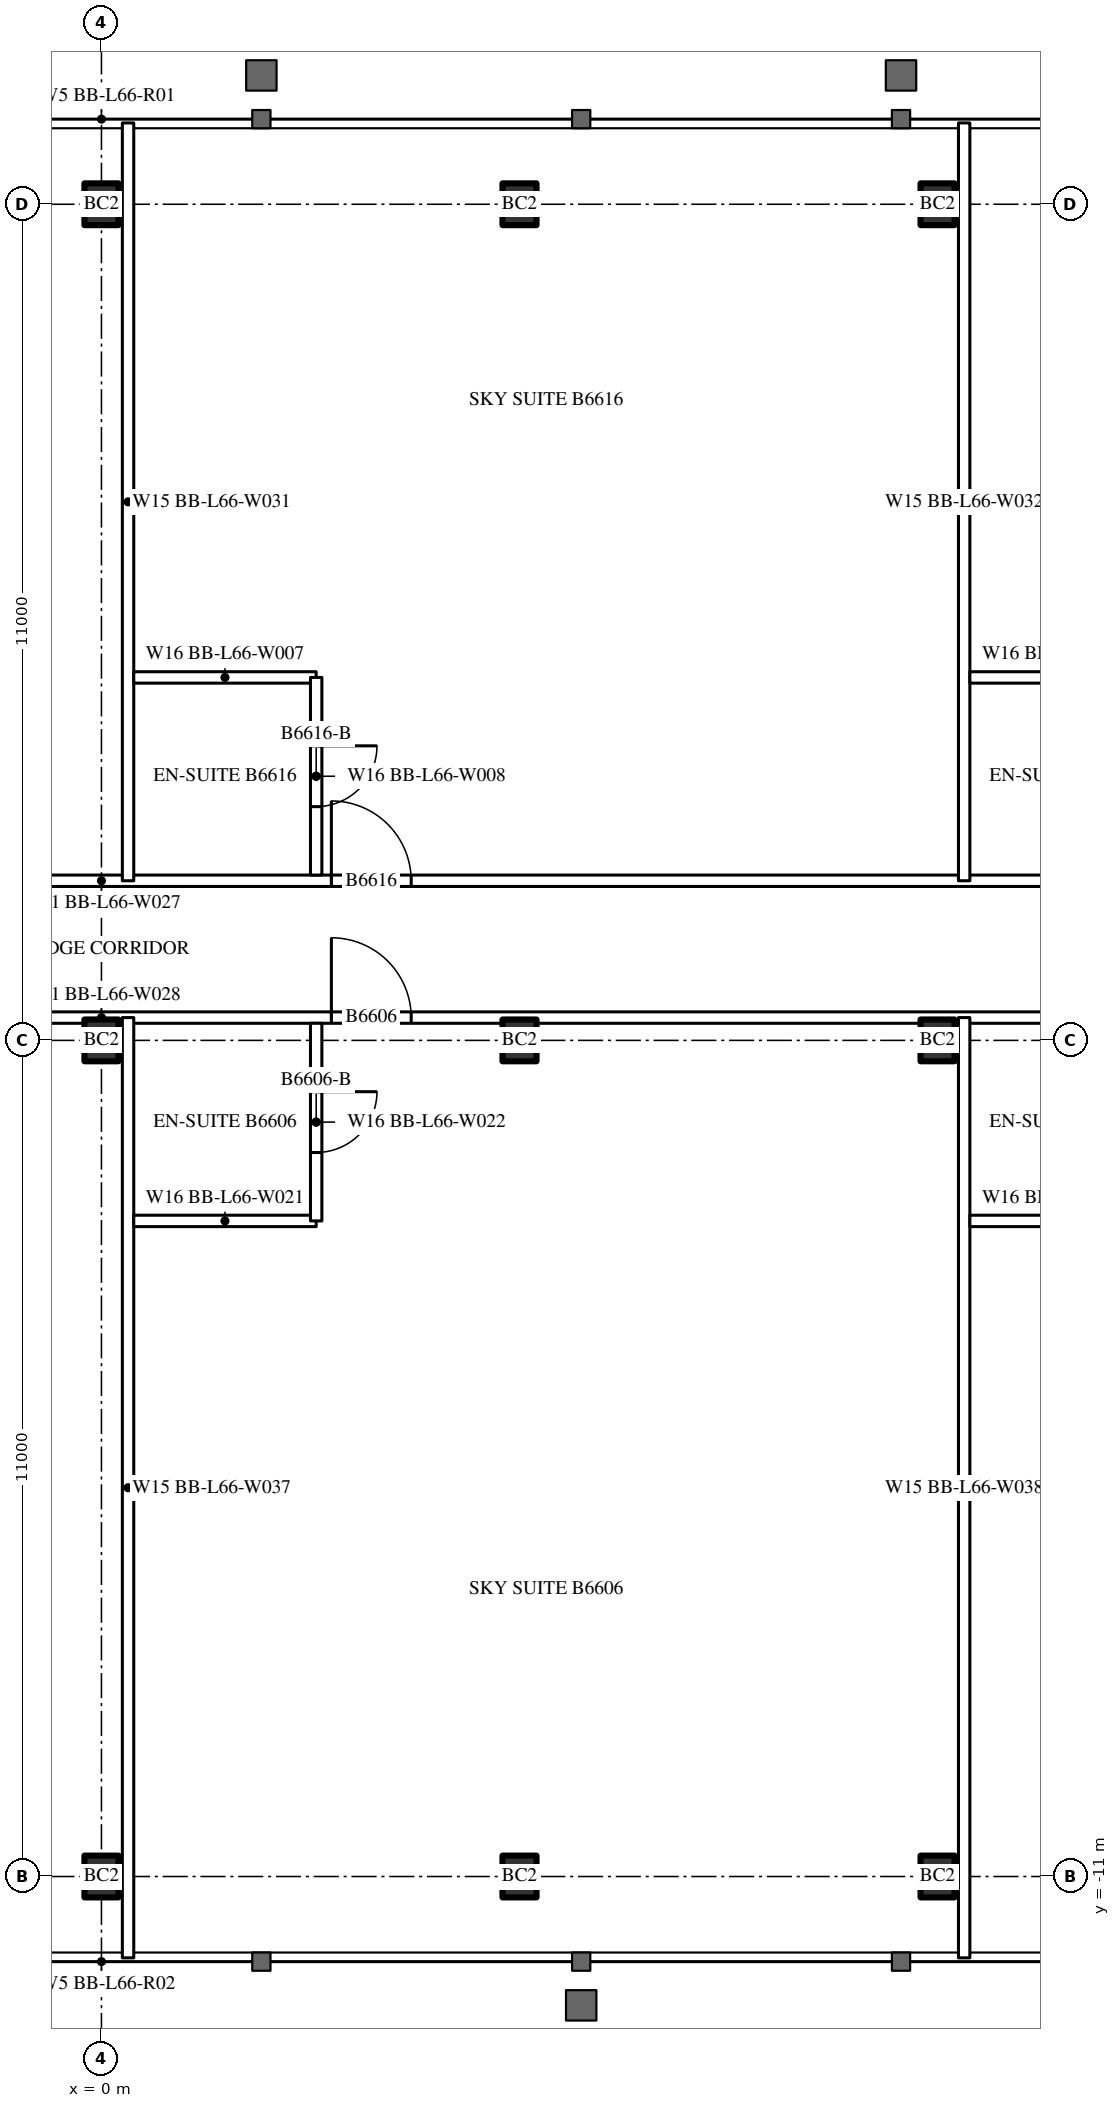
"""IFC4 building model, lengths in metres.
Left out: names, types, materials, properties, quantities, classifications, styles, units other than length and angle.
Written with IfcOpenShell. Run it as: python <this file> out.ifc"""

import sys

from ifc_helpers import new_model, si_unit, direction, frame, frame_2d, origin, origin_2d, place, context, subcontext, project, spatial, rectangle, i_section, extrude, element, fill, save


model = new_model("IFC4")
c1 = context("Model", 3, precision=1e-05, world=origin(), true_north=direction((0.0, 1.0)))
c2 = subcontext(c1, "Body", "Model", "MODEL_VIEW")
j1 = project(units=[si_unit("LENGTHUNIT", "METRE"), si_unit("PLANEANGLEUNIT", "RADIAN")], contexts=[c1])
p1 = place(None, origin())
s1 = spatial("IfcSite", under=j1, at=p1, CompositionType="ELEMENT")
p2 = place(p1, origin())
s2 = spatial("IfcBuilding", under=s1, at=p2, CompositionType="ELEMENT")
p3 = place(p2, frame((0.0, 0.0, 247.7)))
s3 = spatial("IfcBuildingStorey", under=s2, at=p3, CompositionType="ELEMENT", Elevation=247.7)
for number, where, z_axis, x_axis in (
    (1, (0.0, -11.0, 0.0), (0.0, 0.0, 1.0), (1.0, 0.0, 0.0)),
    (2, (5.5, -11.0, 0.0), (0.0, 0.0, 1.0), (1.0, 0.0, 0.0)),
    (3, (11.0, -11.0, 0.0), (0.0, 0.0, 1.0), (1.0, 0.0, 0.0)),
    (4, (0.0, 0.0, 0.0), (0.0, 0.0, 1.0), (1.0, 0.0, 0.0)),
    (5, (5.5, 0.0, 0.0), (0.0, 0.0, 1.0), (1.0, 0.0, 0.0)),
    (6, (11.0, 0.0, 0.0), (0.0, 0.0, 1.0), (1.0, 0.0, 0.0)),
    (7, (0.0, 11.0, 0.0), (0.0, 0.0, 1.0), (1.0, 0.0, 0.0)),
    (8, (5.5, 11.0, 0.0), (0.0, 0.0, 1.0), (1.0, 0.0, 0.0)),
    (9, (11.0, 11.0, 0.0), (0.0, 0.0, 1.0), (1.0, 0.0, 0.0)),
):
    element("IfcColumn", number, at=place(p3, frame(where, z_axis=z_axis, x_axis=x_axis)), inside=s3, PredefinedType="COLUMN", context=c2, shape_type="SweptSolid", body=[
        extrude(i_section(OverallWidth=0.448, OverallDepth=0.55, WebThickness=0.072, FlangeThickness=0.115, FilletRadius=0.02, at=origin_2d()), origin(), (0.0, 0.0, 1.0), 4.2),
    ])
p4 = place(p3, frame((-27.5, 0.3, 0.0), z_axis=(0.0, 0.0, 1.0), x_axis=(1.0, 0.0, 0.0)))
e10 = element("IfcWall", 10, at=p4, inside=s3, PredefinedType="PARTITIONING", context=c2, shape_type="SweptSolid", body=[
    extrude(rectangle(XDim=55.0, YDim=0.15, at=frame_2d((27.5, 0.0))), origin(), (0.0, 0.0, 1.0), 3.0),
])
p5 = place(p4, frame((1.575, 0.0, 0.0)))
e11 = element("IfcOpeningElement", 11, at=p5, cuts=e10, PredefinedType="OPENING", context=c2, shape_type="SweptSolid", body=[
    extrude(rectangle(XDim=1.0, YDim=2.2, at=frame_2d((0.5, 1.1))), frame((0.0, 0.085, 0.0), z_axis=(0.0, -1.0, 0.0), x_axis=(1.0, 0.0, 0.0)), (0.0, 0.0, 1.0), 0.17),
])
p6 = place(p4, frame((8.525, 0.0, 0.0)))
e12 = element("IfcOpeningElement", 12, at=p6, cuts=e10, PredefinedType="OPENING", context=c2, shape_type="SweptSolid", body=[
    extrude(rectangle(XDim=1.05, YDim=2.4, at=frame_2d((0.525, 1.2))), frame((0.0, 0.085, 0.0), z_axis=(0.0, -1.0, 0.0), x_axis=(1.0, 0.0, 0.0)), (0.0, 0.0, 1.0), 0.17),
])
p7 = place(p4, frame((19.525, 0.0, 0.0)))
e13 = element("IfcOpeningElement", 13, at=p7, cuts=e10, PredefinedType="OPENING", context=c2, shape_type="SweptSolid", body=[
    extrude(rectangle(XDim=1.05, YDim=2.4, at=frame_2d((0.525, 1.2))), frame((0.0, 0.085, 0.0), z_axis=(0.0, -1.0, 0.0), x_axis=(1.0, 0.0, 0.0)), (0.0, 0.0, 1.0), 0.17),
])
p8 = place(p4, frame((25.025, 0.0, 0.0)))
e14 = element("IfcOpeningElement", 14, at=p8, cuts=e10, PredefinedType="OPENING", context=c2, shape_type="SweptSolid", body=[
    extrude(rectangle(XDim=1.05, YDim=2.4, at=frame_2d((0.525, 1.2))), frame((0.0, 0.085, 0.0), z_axis=(0.0, -1.0, 0.0), x_axis=(1.0, 0.0, 0.0)), (0.0, 0.0, 1.0), 0.17),
])
p9 = place(p4, frame((30.525, 0.0, 0.0)))
e15 = element("IfcOpeningElement", 15, at=p9, cuts=e10, PredefinedType="OPENING", context=c2, shape_type="SweptSolid", body=[
    extrude(rectangle(XDim=1.05, YDim=2.4, at=frame_2d((0.525, 1.2))), frame((0.0, 0.085, 0.0), z_axis=(0.0, -1.0, 0.0), x_axis=(1.0, 0.0, 0.0)), (0.0, 0.0, 1.0), 0.17),
])
p10 = place(p4, frame((41.525, 0.0, 0.0)))
e16 = element("IfcOpeningElement", 16, at=p10, cuts=e10, PredefinedType="OPENING", context=c2, shape_type="SweptSolid", body=[
    extrude(rectangle(XDim=1.05, YDim=2.4, at=frame_2d((0.525, 1.2))), frame((0.0, 0.085, 0.0), z_axis=(0.0, -1.0, 0.0), x_axis=(1.0, 0.0, 0.0)), (0.0, 0.0, 1.0), 0.17),
])
p11 = place(p4, frame((52.525, 0.0, 0.0)))
e17 = element("IfcOpeningElement", 17, at=p11, cuts=e10, PredefinedType="OPENING", context=c2, shape_type="SweptSolid", body=[
    extrude(rectangle(XDim=1.05, YDim=2.4, at=frame_2d((0.525, 1.2))), frame((0.0, 0.085, 0.0), z_axis=(0.0, -1.0, 0.0), x_axis=(1.0, 0.0, 0.0)), (0.0, 0.0, 1.0), 0.17),
])
p12 = place(p3, frame((-27.5, 2.1, 0.0), z_axis=(0.0, 0.0, 1.0), x_axis=(1.0, 0.0, 0.0)))
e18 = element("IfcWall", 18, at=p12, inside=s3, PredefinedType="PARTITIONING", context=c2, shape_type="SweptSolid", body=[
    extrude(rectangle(XDim=55.0, YDim=0.15, at=frame_2d((27.5, 0.0))), origin(), (0.0, 0.0, 1.0), 4.0),
])
p13 = place(p12, frame((2.025, 0.0, 0.0)))
e19 = element("IfcOpeningElement", 19, at=p13, cuts=e18, PredefinedType="OPENING", context=c2, shape_type="SweptSolid", body=[
    extrude(rectangle(XDim=1.05, YDim=2.4, at=frame_2d((0.525, 1.2))), frame((0.0, 0.085, 0.0), z_axis=(0.0, -1.0, 0.0), x_axis=(1.0, 0.0, 0.0)), (0.0, 0.0, 1.0), 0.17),
])
p14 = place(p12, frame((8.525, 0.0, 0.0)))
e20 = element("IfcOpeningElement", 20, at=p14, cuts=e18, PredefinedType="OPENING", context=c2, shape_type="SweptSolid", body=[
    extrude(rectangle(XDim=1.05, YDim=2.4, at=frame_2d((0.525, 1.2))), frame((0.0, 0.085, 0.0), z_axis=(0.0, -1.0, 0.0), x_axis=(1.0, 0.0, 0.0)), (0.0, 0.0, 1.0), 0.17),
])
p15 = place(p12, frame((19.525, 0.0, 0.0)))
e21 = element("IfcOpeningElement", 21, at=p15, cuts=e18, PredefinedType="OPENING", context=c2, shape_type="SweptSolid", body=[
    extrude(rectangle(XDim=1.05, YDim=2.4, at=frame_2d((0.525, 1.2))), frame((0.0, 0.085, 0.0), z_axis=(0.0, -1.0, 0.0), x_axis=(1.0, 0.0, 0.0)), (0.0, 0.0, 1.0), 0.17),
])
p16 = place(p12, frame((30.525, 0.0, 0.0)))
e22 = element("IfcOpeningElement", 22, at=p16, cuts=e18, PredefinedType="OPENING", context=c2, shape_type="SweptSolid", body=[
    extrude(rectangle(XDim=1.05, YDim=2.4, at=frame_2d((0.525, 1.2))), frame((0.0, 0.085, 0.0), z_axis=(0.0, -1.0, 0.0), x_axis=(1.0, 0.0, 0.0)), (0.0, 0.0, 1.0), 0.17),
])
p17 = place(p12, frame((41.525, 0.0, 0.0)))
e23 = element("IfcOpeningElement", 23, at=p17, cuts=e18, PredefinedType="OPENING", context=c2, shape_type="SweptSolid", body=[
    extrude(rectangle(XDim=1.05, YDim=2.4, at=frame_2d((0.525, 1.2))), frame((0.0, 0.085, 0.0), z_axis=(0.0, -1.0, 0.0), x_axis=(1.0, 0.0, 0.0)), (0.0, 0.0, 1.0), 0.17),
])
p18 = place(p12, frame((52.525, 0.0, 0.0)))
e24 = element("IfcOpeningElement", 24, at=p18, cuts=e18, PredefinedType="OPENING", context=c2, shape_type="SweptSolid", body=[
    extrude(rectangle(XDim=1.05, YDim=2.4, at=frame_2d((0.525, 1.2))), frame((0.0, 0.085, 0.0), z_axis=(0.0, -1.0, 0.0), x_axis=(1.0, 0.0, 0.0)), (0.0, 0.0, 1.0), 0.17),
])
for number, where, z_axis, x_axis in (
    (25, (0.35, -12.07, 0.0), (0.0, 0.0, 1.0), (0.0, 1.0, 0.0)),
    (26, (11.35, -12.07, 0.0), (0.0, 0.0, 1.0), (0.0, 1.0, 0.0)),
):
    element("IfcWall", number, at=place(p3, frame(where, z_axis=z_axis, x_axis=x_axis)), inside=s3, PredefinedType="PARTITIONING", context=c2, shape_type="SweptSolid", body=[
        extrude(rectangle(XDim=12.37, YDim=0.15, at=frame_2d((6.185, 0.0))), origin(), (0.0, 0.0, 1.0), 4.0),
    ])
p19 = place(p3, frame((0.425, -2.375, 0.0), z_axis=(0.0, 0.0, 1.0), x_axis=(1.0, 0.0, 0.0)))
e27 = element("IfcWall", 27, at=p19, inside=s3, PredefinedType="PARTITIONING", context=c2, shape_type="SweptSolid", body=[
    extrude(rectangle(XDim=2.4, YDim=0.15, at=frame_2d((1.2, 0.0))), origin(), (0.0, 0.0, 1.0), 4.0),
])
p20 = place(p3, frame((2.825, -2.375, 0.0), z_axis=(0.0, 0.0, 1.0), x_axis=(0.0, 1.0, 0.0)))
e28 = element("IfcWall", 28, at=p20, inside=s3, PredefinedType="PARTITIONING", context=c2, shape_type="SweptSolid", body=[
    extrude(rectangle(XDim=2.6, YDim=0.15, at=frame_2d((1.3, 0.0))), origin(), (0.0, 0.0, 1.0), 4.0),
])
p21 = place(p20, frame((0.9, 0.0, 0.0)))
e29 = element("IfcOpeningElement", 29, at=p21, cuts=e28, PredefinedType="OPENING", context=c2, shape_type="SweptSolid", body=[
    extrude(rectangle(XDim=0.8, YDim=2.2, at=frame_2d((0.4, 1.1))), frame((0.0, 0.085, 0.0), z_axis=(0.0, -1.0, 0.0), x_axis=(1.0, 0.0, 0.0)), (0.0, 0.0, 1.0), 0.17),
])
p22 = place(p3, frame((11.425, -2.375, 0.0), z_axis=(0.0, 0.0, 1.0), x_axis=(1.0, 0.0, 0.0)))
e30 = element("IfcWall", 30, at=p22, inside=s3, PredefinedType="PARTITIONING", context=c2, shape_type="SweptSolid", body=[
    extrude(rectangle(XDim=2.4, YDim=0.15, at=frame_2d((1.2, 0.0))), origin(), (0.0, 0.0, 1.0), 4.0),
])
for number, where, z_axis, x_axis in (
    (31, (0.35, 2.1, 0.0), (0.0, 0.0, 1.0), (0.0, 1.0, 0.0)),
    (32, (11.35, 2.1, 0.0), (0.0, 0.0, 1.0), (0.0, 1.0, 0.0)),
):
    element("IfcWall", number, at=place(p3, frame(where, z_axis=z_axis, x_axis=x_axis)), inside=s3, PredefinedType="PARTITIONING", context=c2, shape_type="SweptSolid", body=[
        extrude(rectangle(XDim=9.97, YDim=0.15, at=frame_2d((4.985, 0.0))), origin(), (0.0, 0.0, 1.0), 4.0),
    ])
p23 = place(p3, frame((0.425, 4.775, 0.0), z_axis=(0.0, 0.0, 1.0), x_axis=(1.0, 0.0, 0.0)))
e33 = element("IfcWall", 33, at=p23, inside=s3, PredefinedType="PARTITIONING", context=c2, shape_type="SweptSolid", body=[
    extrude(rectangle(XDim=2.4, YDim=0.15, at=frame_2d((1.2, 0.0))), origin(), (0.0, 0.0, 1.0), 4.0),
])
p24 = place(p3, frame((2.825, 2.175, 0.0), z_axis=(0.0, 0.0, 1.0), x_axis=(0.0, 1.0, 0.0)))
e34 = element("IfcWall", 34, at=p24, inside=s3, PredefinedType="PARTITIONING", context=c2, shape_type="SweptSolid", body=[
    extrude(rectangle(XDim=2.6, YDim=0.15, at=frame_2d((1.3, 0.0))), origin(), (0.0, 0.0, 1.0), 4.0),
])
p25 = place(p24, frame((0.9, 0.0, 0.0)))
e35 = element("IfcOpeningElement", 35, at=p25, cuts=e34, PredefinedType="OPENING", context=c2, shape_type="SweptSolid", body=[
    extrude(rectangle(XDim=0.8, YDim=2.2, at=frame_2d((0.4, 1.1))), frame((0.0, 0.085, 0.0), z_axis=(0.0, -1.0, 0.0), x_axis=(1.0, 0.0, 0.0)), (0.0, 0.0, 1.0), 0.17),
])
p26 = place(p3, frame((11.425, 4.775, 0.0), z_axis=(0.0, 0.0, 1.0), x_axis=(1.0, 0.0, 0.0)))
e36 = element("IfcWall", 36, at=p26, inside=s3, PredefinedType="PARTITIONING", context=c2, shape_type="SweptSolid", body=[
    extrude(rectangle(XDim=2.4, YDim=0.15, at=frame_2d((1.2, 0.0))), origin(), (0.0, 0.0, 1.0), 4.0),
])
p27 = place(p21, origin())
e37 = element("IfcDoor", 37, at=p27, inside=s3, OperationType="SINGLE_SWING_RIGHT", PredefinedType="DOOR", context=c2, shape_type="SweptSolid", body=[
    extrude(rectangle(XDim=0.8, YDim=2.2, at=frame_2d((0.4, 1.1))), frame((0.0, 0.025, 0.0), z_axis=(0.0, -1.0, 0.0), x_axis=(1.0, 0.0, 0.0)), (0.0, 0.0, 1.0), 0.05),
])
fill(e29, e37)
p28 = place(p9, origin())
e38 = element("IfcDoor", 38, at=p28, inside=s3, OperationType="SINGLE_SWING_LEFT", PredefinedType="DOOR", context=c2, shape_type="SweptSolid", body=[
    extrude(rectangle(XDim=1.05, YDim=2.4, at=frame_2d((0.525, 1.2))), frame((0.0, 0.025, 0.0), z_axis=(0.0, -1.0, 0.0), x_axis=(1.0, 0.0, 0.0)), (0.0, 0.0, 1.0), 0.05),
])
fill(e15, e38)
p29 = place(p25, origin())
e39 = element("IfcDoor", 39, at=p29, inside=s3, OperationType="SINGLE_SWING_RIGHT", PredefinedType="DOOR", context=c2, shape_type="SweptSolid", body=[
    extrude(rectangle(XDim=0.8, YDim=2.2, at=frame_2d((0.4, 1.1))), frame((0.0, 0.025, 0.0), z_axis=(0.0, -1.0, 0.0), x_axis=(1.0, 0.0, 0.0)), (0.0, 0.0, 1.0), 0.05),
])
fill(e35, e39)
p30 = place(p16, origin())
e40 = element("IfcDoor", 40, at=p30, inside=s3, OperationType="SINGLE_SWING_LEFT", PredefinedType="DOOR", context=c2, shape_type="SweptSolid", body=[
    extrude(rectangle(XDim=1.05, YDim=2.4, at=frame_2d((0.525, 1.2))), frame((0.0, 0.025, 0.0), z_axis=(0.0, -1.0, 0.0), x_axis=(1.0, 0.0, 0.0)), (0.0, 0.0, 1.0), 0.05),
])
fill(e22, e40)
save(model, sys.argv[1])
